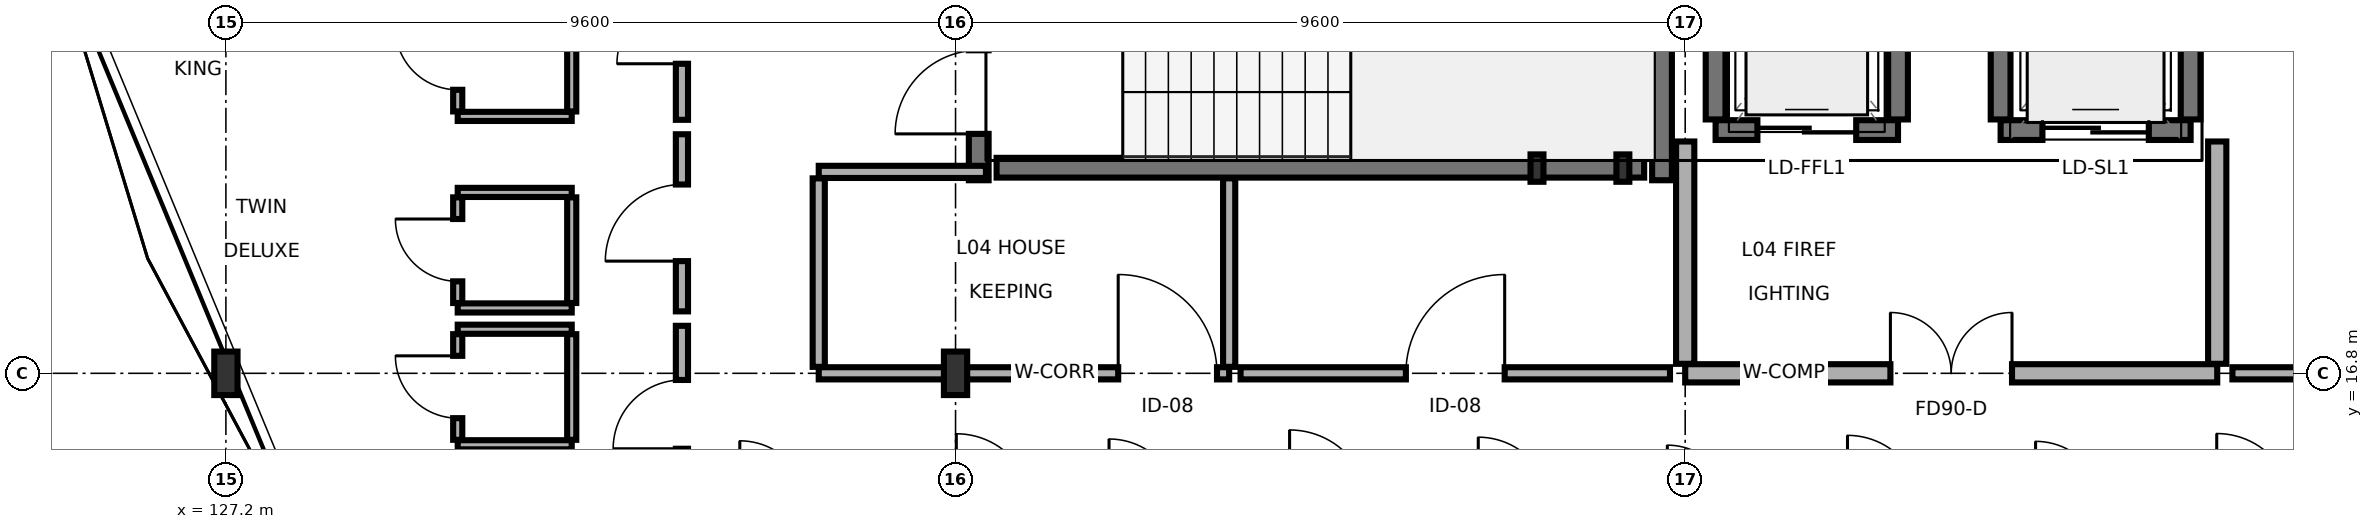
"""IFC4 building model, lengths in metres.
Left out: names, types, materials, properties, quantities, classifications, styles, units other than length and angle.
Written with IfcOpenShell. Run it as: python <this file> out.ifc"""

import sys

from ifc_helpers import new_model, si_unit, direction, frame, frame_2d, origin, origin_2d, place, context, subcontext, project, spatial, rectangle, i_section, extrude, element, fill, save


model = new_model("IFC4")
c1 = context("Model", 3, precision=1e-05, world=origin(), true_north=direction((0.0, 1.0)))
c2 = subcontext(c1, "Body", "Model", "MODEL_VIEW")
j1 = project(units=[si_unit("LENGTHUNIT", "METRE"), si_unit("PLANEANGLEUNIT", "RADIAN")], contexts=[c1])
p1 = place(None, origin())
s1 = spatial("IfcSite", under=j1, at=p1, CompositionType="ELEMENT")
p2 = place(p1, origin())
s2 = spatial("IfcBuilding", under=s1, at=p2, CompositionType="ELEMENT")
p3 = place(p2, frame((0.0, 0.0, 14.7)))
s3 = spatial("IfcBuildingStorey", under=s2, at=p3, CompositionType="ELEMENT", Elevation=14.7)
p4 = place(p3, frame((136.8, 16.8, 0.0), z_axis=(0.0, 0.0, 1.0), x_axis=(1.0, 0.0, 0.0)))
e1 = element("IfcColumn", 1, at=p4, inside=s3, PredefinedType="COLUMN", context=c2, shape_type="SweptSolid", body=[
    extrude(i_section(OverallWidth=0.306, OverallDepth=0.572, WebThickness=0.021, FlangeThickness=0.04, FilletRadius=0.027, at=origin_2d()), origin(), (0.0, 0.0, 1.0), 3.4),
])
for number, where, z_axis, x_axis in (
    (2, (144.45, 19.5, 0.0), (0.0, 0.0, 1.0), (1.0, 0.0, 0.0)),
    (3, (145.58, 19.5, 0.0), (0.0, 0.0, 1.0), (1.0, 0.0, 0.0)),
):
    element("IfcColumn", number, at=place(p3, frame(where, z_axis=z_axis, x_axis=x_axis)), inside=s3, PredefinedType="PILASTER", context=c2, shape_type="SweptSolid", body=[
        extrude(i_section(OverallWidth=0.17, OverallDepth=0.36, WebThickness=0.008, FlangeThickness=0.013, FilletRadius=0.018, at=origin_2d()), origin(), (0.0, 0.0, 1.0), 3.4),
    ])
p5 = place(p3, frame((127.2, 16.8, 0.0), z_axis=(0.0, 0.0, 1.0), x_axis=(1.0, 0.0, 0.0)))
e4 = element("IfcColumn", 4, at=p5, inside=s3, PredefinedType="COLUMN", context=c2, shape_type="SweptSolid", body=[
    extrude(i_section(OverallWidth=0.306, OverallDepth=0.572, WebThickness=0.021, FlangeThickness=0.04, FilletRadius=0.027, at=origin_2d()), origin(), (0.0, 0.0, 1.0), 3.4),
])
p6 = place(p3, frame((137.105, 19.34, 0.0), z_axis=(0.0, 0.0, 1.0), x_axis=(0.0, 1.0, 0.0)))
e5 = element("IfcWall", 5, at=p6, inside=s3, PredefinedType="SHEAR", context=c2, shape_type="SweptSolid", body=[
    extrude(rectangle(XDim=4.27, YDim=0.26, at=frame_2d((2.135, 0.0))), origin(), (0.0, 0.0, 1.0), 3.215),
])
p7 = place(p6, frame((0.61, 0.0, 0.0)))
e6 = element("IfcOpeningElement", 6, at=p7, cuts=e5, PredefinedType="OPENING", context=c2, shape_type="SweptSolid", body=[
    extrude(rectangle(XDim=1.1, YDim=2.2, at=frame_2d((0.55, 1.1))), frame((0.0, 0.14, 0.0), z_axis=(0.0, -1.0, 0.0), x_axis=(1.0, 0.0, 0.0)), (0.0, 0.0, 1.0), 0.28),
])
p8 = place(p3, frame((146.095, 19.34, 0.0), z_axis=(0.0, 0.0, 1.0), x_axis=(0.0, 1.0, 0.0)))
e7 = element("IfcWall", 7, at=p8, inside=s3, PredefinedType="SHEAR", context=c2, shape_type="SweptSolid", body=[
    extrude(rectangle(XDim=4.27, YDim=0.26, at=frame_2d((2.135, 0.0))), origin(), (0.0, 0.0, 1.0), 3.215),
])
p9 = place(p3, frame((137.34, 19.505, 0.0), z_axis=(0.0, 0.0, 1.0), x_axis=(1.0, 0.0, 0.0)))
e8 = element("IfcWall", 8, at=p9, inside=s3, PredefinedType="SHEAR", context=c2, shape_type="SweptSolid", body=[
    extrude(rectangle(XDim=8.52, YDim=0.26, at=frame_2d((4.26, 0.0))), origin(), (0.0, 0.0, 1.0), 3.215),
])
p10 = place(p3, frame((146.8, 20.0, 0.0), z_axis=(0.0, 0.0, 1.0), x_axis=(1.0, 0.0, 0.0)))
e9 = element("IfcWall", 9, at=p10, inside=s3, PredefinedType="SHEAR", context=c2, shape_type="SweptSolid", body=[
    extrude(rectangle(XDim=2.4, YDim=0.26, at=frame_2d((1.2, 0.0))), origin(), (0.0, 0.0, 1.0), 3.215),
])
p11 = place(p10, frame((0.55, 0.0, 0.0)))
e10 = element("IfcOpeningElement", 10, at=p11, cuts=e9, PredefinedType="OPENING", context=c2, shape_type="SweptSolid", body=[
    extrude(rectangle(XDim=1.3, YDim=2.25, at=frame_2d((0.65, 1.125))), frame((0.0, 0.14, 0.0), z_axis=(0.0, -1.0, 0.0), x_axis=(1.0, 0.0, 0.0)), (0.0, 0.0, 1.0), 0.28),
])
for number, where, z_axis, x_axis in (
    (11, (146.8, 20.14, 0.0), (0.0, 0.0, 1.0), (0.0, 1.0, 0.0)),
    (12, (149.2, 20.14, 0.0), (0.0, 0.0, 1.0), (0.0, 1.0, 0.0)),
):
    element("IfcWall", number, at=place(p3, frame(where, z_axis=z_axis, x_axis=x_axis)), inside=s3, PredefinedType="SHEAR", context=c2, shape_type="SweptSolid", body=[
        extrude(rectangle(XDim=2.52, YDim=0.26, at=frame_2d((1.26, 0.0))), origin(), (0.0, 0.0, 1.0), 3.215),
    ])
p12 = place(p3, frame((150.55, 20.0, 0.0), z_axis=(0.0, 0.0, 1.0), x_axis=(1.0, 0.0, 0.0)))
e13 = element("IfcWall", 13, at=p12, inside=s3, PredefinedType="SHEAR", context=c2, shape_type="SweptSolid", body=[
    extrude(rectangle(XDim=2.5, YDim=0.26, at=frame_2d((1.25, 0.0))), origin(), (0.0, 0.0, 1.0), 3.215),
])
p13 = place(p12, frame((0.55, 0.0, 0.0)))
e14 = element("IfcOpeningElement", 14, at=p13, cuts=e13, PredefinedType="OPENING", context=c2, shape_type="SweptSolid", body=[
    extrude(rectangle(XDim=1.4, YDim=2.3, at=frame_2d((0.7, 1.15))), frame((0.0, 0.14, 0.0), z_axis=(0.0, -1.0, 0.0), x_axis=(1.0, 0.0, 0.0)), (0.0, 0.0, 1.0), 0.28),
])
for number, where, z_axis, x_axis in (
    (15, (150.55, 20.14, 0.0), (0.0, 0.0, 1.0), (0.0, 1.0, 0.0)),
    (16, (153.05, 20.14, 0.0), (0.0, 0.0, 1.0), (0.0, 1.0, 0.0)),
):
    element("IfcWall", number, at=place(p3, frame(where, z_axis=z_axis, x_axis=x_axis)), inside=s3, PredefinedType="SHEAR", context=c2, shape_type="SweptSolid", body=[
        extrude(rectangle(XDim=2.52, YDim=0.26, at=frame_2d((1.26, 0.0))), origin(), (0.0, 0.0, 1.0), 3.215),
    ])
p14 = place(p3, frame((146.4, 16.8, 0.0), z_axis=(0.0, 0.0, 1.0), x_axis=(1.0, 0.0, 0.0)))
e17 = element("IfcWall", 17, at=p14, inside=s3, PredefinedType="SOLIDWALL", context=c2, shape_type="SweptSolid", body=[
    extrude(rectangle(XDim=7.0, YDim=0.24, at=frame_2d((3.5, 0.0))), origin(), (0.0, 0.0, 1.0), 2.75),
])
p15 = place(p14, frame((2.7, 0.0, 0.0)))
e18 = element("IfcOpeningElement", 18, at=p15, cuts=e17, PredefinedType="OPENING", context=c2, shape_type="SweptSolid", body=[
    extrude(rectangle(XDim=1.6, YDim=2.2, at=frame_2d((0.8, 1.1))), frame((0.0, 0.13, 0.0), z_axis=(0.0, -1.0, 0.0), x_axis=(1.0, 0.0, 0.0)), (0.0, 0.0, 1.0), 0.26),
])
for number, where, z_axis, x_axis in (
    (19, (146.4, 16.925, 0.0), (0.0, 0.0, 1.0), (0.0, 1.0, 0.0)),
    (20, (153.4, 16.925, 0.0), (0.0, 0.0, 1.0), (0.0, 1.0, 0.0)),
):
    element("IfcWall", number, at=place(p3, frame(where, z_axis=z_axis, x_axis=x_axis)), inside=s3, PredefinedType="SOLIDWALL", context=c2, shape_type="SweptSolid", body=[
        extrude(rectangle(XDim=2.925, YDim=0.24, at=frame_2d((1.462, 0.0))), origin(), (0.0, 0.0, 1.0), 2.75),
    ])
p16 = place(p3, frame((135.0, 16.8, 0.0), z_axis=(0.0, 0.0, 1.0), x_axis=(1.0, 0.0, 0.0)))
e21 = element("IfcWall", 21, at=p16, inside=s3, PredefinedType="PARTITIONING", context=c2, shape_type="SweptSolid", body=[
    extrude(rectangle(XDim=5.4, YDim=0.16, at=frame_2d((2.7, 0.0))), origin(), (0.0, 0.0, 1.0), 2.75),
])
p17 = place(p16, frame((3.94, 0.0, 0.0)))
e22 = element("IfcOpeningElement", 22, at=p17, cuts=e21, PredefinedType="OPENING", context=c2, shape_type="SweptSolid", body=[
    extrude(rectangle(XDim=1.3, YDim=2.2, at=frame_2d((0.65, 1.1))), frame((0.0, 0.09, 0.0), z_axis=(0.0, -1.0, 0.0), x_axis=(1.0, 0.0, 0.0)), (0.0, 0.0, 1.0), 0.18),
])
for number, where, z_axis, x_axis in (
    (23, (135.0, 16.885, 0.0), (0.0, 0.0, 1.0), (0.0, 1.0, 0.0)),
    (24, (140.4, 16.885, 0.0), (0.0, 0.0, 1.0), (0.0, 1.0, 0.0)),
):
    element("IfcWall", number, at=place(p3, frame(where, z_axis=z_axis, x_axis=x_axis)), inside=s3, PredefinedType="PARTITIONING", context=c2, shape_type="SweptSolid", body=[
        extrude(rectangle(XDim=2.48, YDim=0.16, at=frame_2d((1.24, 0.0))), origin(), (0.0, 0.0, 1.0), 2.75),
    ])
p18 = place(p3, frame((135.0, 19.45, 0.0), z_axis=(0.0, 0.0, 1.0), x_axis=(1.0, 0.0, 0.0)))
e25 = element("IfcWall", 25, at=p18, inside=s3, PredefinedType="PARTITIONING", context=c2, shape_type="SweptSolid", body=[
    extrude(rectangle(XDim=2.2, YDim=0.16, at=frame_2d((1.1, 0.0))), origin(), (0.0, 0.0, 1.0), 2.75),
])
p19 = place(p3, frame((140.55, 16.8, 0.0), z_axis=(0.0, 0.0, 1.0), x_axis=(1.0, 0.0, 0.0)))
e26 = element("IfcWall", 26, at=p19, inside=s3, PredefinedType="PARTITIONING", context=c2, shape_type="SweptSolid", body=[
    extrude(rectangle(XDim=5.65, YDim=0.16, at=frame_2d((2.825, 0.0))), origin(), (0.0, 0.0, 1.0), 2.75),
])
p20 = place(p19, frame((2.175, 0.0, 0.0)))
e27 = element("IfcOpeningElement", 27, at=p20, cuts=e26, PredefinedType="OPENING", context=c2, shape_type="SweptSolid", body=[
    extrude(rectangle(XDim=1.3, YDim=2.2, at=frame_2d((0.65, 1.1))), frame((0.0, 0.09, 0.0), z_axis=(0.0, -1.0, 0.0), x_axis=(1.0, 0.0, 0.0)), (0.0, 0.0, 1.0), 0.18),
])
p21 = place(p3, frame((153.6, 16.8, 0.0), z_axis=(0.0, 0.0, 1.0), x_axis=(1.0, 0.0, 0.0)))
e28 = element("IfcWall", 28, at=p21, inside=s3, PredefinedType="PARTITIONING", context=c2, shape_type="SweptSolid", body=[
    extrude(rectangle(XDim=1.8, YDim=0.16, at=frame_2d((0.9, 0.0))), origin(), (0.0, 0.0, 1.0), 2.75),
])
p22 = place(p3, frame((133.2, 20.135, 0.0), z_axis=(0.0, 0.0, 1.0), x_axis=(0.0, 1.0, 0.0)))
e29 = element("IfcWall", 29, at=p22, inside=s3, PredefinedType="PARTITIONING", context=c2, shape_type="SweptSolid", body=[
    extrude(rectangle(XDim=2.33, YDim=0.16, at=frame_2d((1.165, 0.0))), origin(), (0.0, 0.0, 1.0), 3.215),
])
p23 = place(p22, frame((0.738, 0.0, 0.0)))
e30 = element("IfcOpeningElement", 30, at=p23, cuts=e29, PredefinedType="OPENING", context=c2, shape_type="SweptSolid", body=[
    extrude(rectangle(XDim=0.855, YDim=2.05, at=frame_2d((0.427, 1.025))), frame((0.0, 0.09, 0.0), z_axis=(0.0, -1.0, 0.0), x_axis=(1.0, 0.0, 0.0)), (0.0, 0.0, 1.0), 0.18),
])
p24 = place(p3, frame((130.25, 20.18, 0.0), z_axis=(0.0, 0.0, 1.0), x_axis=(1.0, 0.0, 0.0)))
e31 = element("IfcWall", 31, at=p24, inside=s3, PredefinedType="PARTITIONING", context=c2, shape_type="SweptSolid", body=[
    extrude(rectangle(XDim=1.5, YDim=0.12, at=frame_2d((0.75, 0.0))), origin(), (0.0, 0.0, 1.0), 3.215),
])
p25 = place(p3, frame((130.25, 20.245, 0.0), z_axis=(0.0, 0.0, 1.0), x_axis=(0.0, 1.0, 0.0)))
e32 = element("IfcWall", 32, at=p25, inside=s3, PredefinedType="PARTITIONING", context=c2, shape_type="SweptSolid", body=[
    extrude(rectangle(XDim=1.39, YDim=0.12, at=frame_2d((0.695, 0.0))), origin(), (0.0, 0.0, 1.0), 3.215),
])
p26 = place(p25, frame((0.285, 0.0, 0.0)))
e33 = element("IfcOpeningElement", 33, at=p26, cuts=e32, PredefinedType="OPENING", context=c2, shape_type="SweptSolid", body=[
    extrude(rectangle(XDim=0.82, YDim=2.08, at=frame_2d((0.41, 1.04))), frame((0.0, 0.07, 0.0), z_axis=(0.0, -1.0, 0.0), x_axis=(1.0, 0.0, 0.0)), (0.0, 0.0, 1.0), 0.14),
])
p27 = place(p3, frame((131.75, 20.245, 0.0), z_axis=(0.0, 0.0, 1.0), x_axis=(0.0, 1.0, 0.0)))
e34 = element("IfcWall", 34, at=p27, inside=s3, PredefinedType="PARTITIONING", context=c2, shape_type="SweptSolid", body=[
    extrude(rectangle(XDim=1.39, YDim=0.12, at=frame_2d((0.695, 0.0))), origin(), (0.0, 0.0, 1.0), 3.215),
])
p28 = place(p3, frame((133.2, 17.615, 0.0), z_axis=(0.0, 0.0, 1.0), x_axis=(0.0, 1.0, 0.0)))
e35 = element("IfcWall", 35, at=p28, inside=s3, PredefinedType="PARTITIONING", context=c2, shape_type="SweptSolid", body=[
    extrude(rectangle(XDim=2.33, YDim=0.16, at=frame_2d((1.165, 0.0))), origin(), (0.0, 0.0, 1.0), 3.215),
])
p29 = place(p28, frame((0.661, 0.0, 0.0)))
e36 = element("IfcOpeningElement", 36, at=p29, cuts=e35, PredefinedType="OPENING", context=c2, shape_type="SweptSolid", body=[
    extrude(rectangle(XDim=1.008, YDim=2.13, at=frame_2d((0.504, 1.065))), frame((0.0, 0.09, 0.0), z_axis=(0.0, -1.0, 0.0), x_axis=(1.0, 0.0, 0.0)), (0.0, 0.0, 1.0), 0.18),
])
for number, where, z_axis, x_axis in (
    (37, (130.25, 17.66, 0.0), (0.0, 0.0, 1.0), (1.0, 0.0, 0.0)),
    (38, (130.25, 19.18, 0.0), (0.0, 0.0, 1.0), (1.0, 0.0, 0.0)),
):
    element("IfcWall", number, at=place(p3, frame(where, z_axis=z_axis, x_axis=x_axis)), inside=s3, PredefinedType="PARTITIONING", context=c2, shape_type="SweptSolid", body=[
        extrude(rectangle(XDim=1.5, YDim=0.12, at=frame_2d((0.75, 0.0))), origin(), (0.0, 0.0, 1.0), 3.215),
    ])
p30 = place(p3, frame((130.25, 17.725, 0.0), z_axis=(0.0, 0.0, 1.0), x_axis=(0.0, 1.0, 0.0)))
e39 = element("IfcWall", 39, at=p30, inside=s3, PredefinedType="PARTITIONING", context=c2, shape_type="SweptSolid", body=[
    extrude(rectangle(XDim=1.39, YDim=0.12, at=frame_2d((0.695, 0.0))), origin(), (0.0, 0.0, 1.0), 3.215),
])
p31 = place(p30, frame((0.285, 0.0, 0.0)))
e40 = element("IfcOpeningElement", 40, at=p31, cuts=e39, PredefinedType="OPENING", context=c2, shape_type="SweptSolid", body=[
    extrude(rectangle(XDim=0.82, YDim=2.08, at=frame_2d((0.41, 1.04))), frame((0.0, 0.07, 0.0), z_axis=(0.0, -1.0, 0.0), x_axis=(1.0, 0.0, 0.0)), (0.0, 0.0, 1.0), 0.14),
])
p32 = place(p3, frame((131.75, 17.725, 0.0), z_axis=(0.0, 0.0, 1.0), x_axis=(0.0, 1.0, 0.0)))
e41 = element("IfcWall", 41, at=p32, inside=s3, PredefinedType="PARTITIONING", context=c2, shape_type="SweptSolid", body=[
    extrude(rectangle(XDim=1.39, YDim=0.12, at=frame_2d((0.695, 0.0))), origin(), (0.0, 0.0, 1.0), 3.215),
])
p33 = place(p3, frame((133.2, 15.095, 0.0), z_axis=(0.0, 0.0, 1.0), x_axis=(0.0, 1.0, 0.0)))
e42 = element("IfcWall", 42, at=p33, inside=s3, PredefinedType="PARTITIONING", context=c2, shape_type="SweptSolid", body=[
    extrude(rectangle(XDim=2.33, YDim=0.16, at=frame_2d((1.165, 0.0))), origin(), (0.0, 0.0, 1.0), 2.75),
])
p34 = place(p33, frame((0.712, 0.0, 0.0)))
e43 = element("IfcOpeningElement", 43, at=p34, cuts=e42, PredefinedType="OPENING", context=c2, shape_type="SweptSolid", body=[
    extrude(rectangle(XDim=0.905, YDim=2.05, at=frame_2d((0.453, 1.025))), frame((0.0, 0.09, 0.0), z_axis=(0.0, -1.0, 0.0), x_axis=(1.0, 0.0, 0.0)), (0.0, 0.0, 1.0), 0.18),
])
for number, where, z_axis, x_axis in (
    (44, (130.25, 15.86, 0.0), (0.0, 0.0, 1.0), (1.0, 0.0, 0.0)),
    (45, (130.25, 17.38, 0.0), (0.0, 0.0, 1.0), (1.0, 0.0, 0.0)),
):
    element("IfcWall", number, at=place(p3, frame(where, z_axis=z_axis, x_axis=x_axis)), inside=s3, PredefinedType="PARTITIONING", context=c2, shape_type="SweptSolid", body=[
        extrude(rectangle(XDim=1.5, YDim=0.12, at=frame_2d((0.75, 0.0))), origin(), (0.0, 0.0, 1.0), 3.215),
    ])
p35 = place(p3, frame((130.25, 15.925, 0.0), z_axis=(0.0, 0.0, 1.0), x_axis=(0.0, 1.0, 0.0)))
e46 = element("IfcWall", 46, at=p35, inside=s3, PredefinedType="PARTITIONING", context=c2, shape_type="SweptSolid", body=[
    extrude(rectangle(XDim=1.39, YDim=0.12, at=frame_2d((0.695, 0.0))), origin(), (0.0, 0.0, 1.0), 2.75),
])
p36 = place(p35, frame((0.285, 0.0, 0.0)))
e47 = element("IfcOpeningElement", 47, at=p36, cuts=e46, PredefinedType="OPENING", context=c2, shape_type="SweptSolid", body=[
    extrude(rectangle(XDim=0.82, YDim=2.08, at=frame_2d((0.41, 1.04))), frame((0.0, 0.07, 0.0), z_axis=(0.0, -1.0, 0.0), x_axis=(1.0, 0.0, 0.0)), (0.0, 0.0, 1.0), 0.14),
])
p37 = place(p3, frame((131.75, 15.925, 0.0), z_axis=(0.0, 0.0, 1.0), x_axis=(0.0, 1.0, 0.0)))
e48 = element("IfcWall", 48, at=p37, inside=s3, PredefinedType="PARTITIONING", context=c2, shape_type="SweptSolid", body=[
    extrude(rectangle(XDim=1.39, YDim=0.12, at=frame_2d((0.695, 0.0))), origin(), (0.0, 0.0, 1.0), 2.75),
])
p38 = place(p7, origin())
e49 = element("IfcDoor", 49, at=p38, inside=s3, OperationType="SINGLE_SWING_LEFT", PredefinedType="DOOR", context=c2, shape_type="SweptSolid", body=[
    extrude(rectangle(XDim=1.1, YDim=2.2, at=frame_2d((0.55, 1.1))), frame((0.0, 0.025, 0.0), z_axis=(0.0, -1.0, 0.0), x_axis=(1.0, 0.0, 0.0)), (0.0, 0.0, 1.0), 0.05),
])
fill(e6, e49)
p39 = place(p11, origin())
e50 = element("IfcDoor", 50, at=p39, inside=s3, OperationType="SLIDING_TO_RIGHT", PredefinedType="DOOR", context=c2, shape_type="SweptSolid", body=[
    extrude(rectangle(XDim=1.3, YDim=2.25, at=frame_2d((0.65, 1.125))), frame((0.0, 0.025, 0.0), z_axis=(0.0, -1.0, 0.0), x_axis=(1.0, 0.0, 0.0)), (0.0, 0.0, 1.0), 0.05),
])
fill(e10, e50)
p40 = place(p13, origin())
e51 = element("IfcDoor", 51, at=p40, inside=s3, OperationType="SLIDING_TO_LEFT", PredefinedType="DOOR", context=c2, shape_type="SweptSolid", body=[
    extrude(rectangle(XDim=1.4, YDim=2.3, at=frame_2d((0.7, 1.15))), frame((0.0, 0.025, 0.0), z_axis=(0.0, -1.0, 0.0), x_axis=(1.0, 0.0, 0.0)), (0.0, 0.0, 1.0), 0.05),
])
fill(e14, e51)
p41 = place(p15, origin())
e52 = element("IfcDoor", 52, at=p41, inside=s3, OperationType="DOUBLE_DOOR_SINGLE_SWING", PredefinedType="DOOR", context=c2, shape_type="SweptSolid", body=[
    extrude(rectangle(XDim=1.6, YDim=2.2, at=frame_2d((0.8, 1.1))), frame((0.0, 0.025, 0.0), z_axis=(0.0, -1.0, 0.0), x_axis=(1.0, 0.0, 0.0)), (0.0, 0.0, 1.0), 0.05),
])
fill(e18, e52)
p42 = place(p17, origin())
e53 = element("IfcDoor", 53, at=p42, inside=s3, OperationType="SINGLE_SWING_LEFT", PredefinedType="DOOR", context=c2, shape_type="SweptSolid", body=[
    extrude(rectangle(XDim=1.3, YDim=2.2, at=frame_2d((0.65, 1.1))), frame((0.0, 0.025, 0.0), z_axis=(0.0, -1.0, 0.0), x_axis=(1.0, 0.0, 0.0)), (0.0, 0.0, 1.0), 0.05),
])
fill(e22, e53)
p43 = place(p20, origin())
e54 = element("IfcDoor", 54, at=p43, inside=s3, OperationType="SINGLE_SWING_RIGHT", PredefinedType="DOOR", context=c2, shape_type="SweptSolid", body=[
    extrude(rectangle(XDim=1.3, YDim=2.2, at=frame_2d((0.65, 1.1))), frame((0.0, 0.025, 0.0), z_axis=(0.0, -1.0, 0.0), x_axis=(1.0, 0.0, 0.0)), (0.0, 0.0, 1.0), 0.05),
])
fill(e27, e54)
p44 = place(p23, origin())
e55 = element("IfcDoor", 55, at=p44, inside=s3, OperationType="SINGLE_SWING_LEFT", PredefinedType="DOOR", context=c2, shape_type="SweptSolid", body=[
    extrude(rectangle(XDim=0.855, YDim=2.05, at=frame_2d((0.427, 1.025))), frame((0.0, 0.025, 0.0), z_axis=(0.0, -1.0, 0.0), x_axis=(1.0, 0.0, 0.0)), (0.0, 0.0, 1.0), 0.05),
])
fill(e30, e55)
p45 = place(p26, origin())
e56 = element("IfcDoor", 56, at=p45, inside=s3, OperationType="SINGLE_SWING_RIGHT", PredefinedType="DOOR", context=c2, shape_type="SweptSolid", body=[
    extrude(rectangle(XDim=0.82, YDim=2.08, at=frame_2d((0.41, 1.04))), frame((0.0, 0.025, 0.0), z_axis=(0.0, -1.0, 0.0), x_axis=(1.0, 0.0, 0.0)), (0.0, 0.0, 1.0), 0.05),
])
fill(e33, e56)
p46 = place(p29, origin())
e57 = element("IfcDoor", 57, at=p46, inside=s3, OperationType="SINGLE_SWING_LEFT", PredefinedType="DOOR", context=c2, shape_type="SweptSolid", body=[
    extrude(rectangle(XDim=1.008, YDim=2.13, at=frame_2d((0.504, 1.065))), frame((0.0, 0.025, 0.0), z_axis=(0.0, -1.0, 0.0), x_axis=(1.0, 0.0, 0.0)), (0.0, 0.0, 1.0), 0.05),
])
fill(e36, e57)
p47 = place(p31, origin())
e58 = element("IfcDoor", 58, at=p47, inside=s3, OperationType="SINGLE_SWING_RIGHT", PredefinedType="DOOR", context=c2, shape_type="SweptSolid", body=[
    extrude(rectangle(XDim=0.82, YDim=2.08, at=frame_2d((0.41, 1.04))), frame((0.0, 0.025, 0.0), z_axis=(0.0, -1.0, 0.0), x_axis=(1.0, 0.0, 0.0)), (0.0, 0.0, 1.0), 0.05),
])
fill(e40, e58)
p48 = place(p34, origin())
e59 = element("IfcDoor", 59, at=p48, inside=s3, OperationType="SINGLE_SWING_LEFT", PredefinedType="DOOR", context=c2, shape_type="SweptSolid", body=[
    extrude(rectangle(XDim=0.905, YDim=2.05, at=frame_2d((0.453, 1.025))), frame((0.0, 0.025, 0.0), z_axis=(0.0, -1.0, 0.0), x_axis=(1.0, 0.0, 0.0)), (0.0, 0.0, 1.0), 0.05),
])
fill(e43, e59)
p49 = place(p36, origin())
e60 = element("IfcDoor", 60, at=p49, inside=s3, OperationType="SINGLE_SWING_RIGHT", PredefinedType="DOOR", context=c2, shape_type="SweptSolid", body=[
    extrude(rectangle(XDim=0.82, YDim=2.08, at=frame_2d((0.41, 1.04))), frame((0.0, 0.025, 0.0), z_axis=(0.0, -1.0, 0.0), x_axis=(1.0, 0.0, 0.0)), (0.0, 0.0, 1.0), 0.05),
])
fill(e47, e60)
save(model, sys.argv[1])
